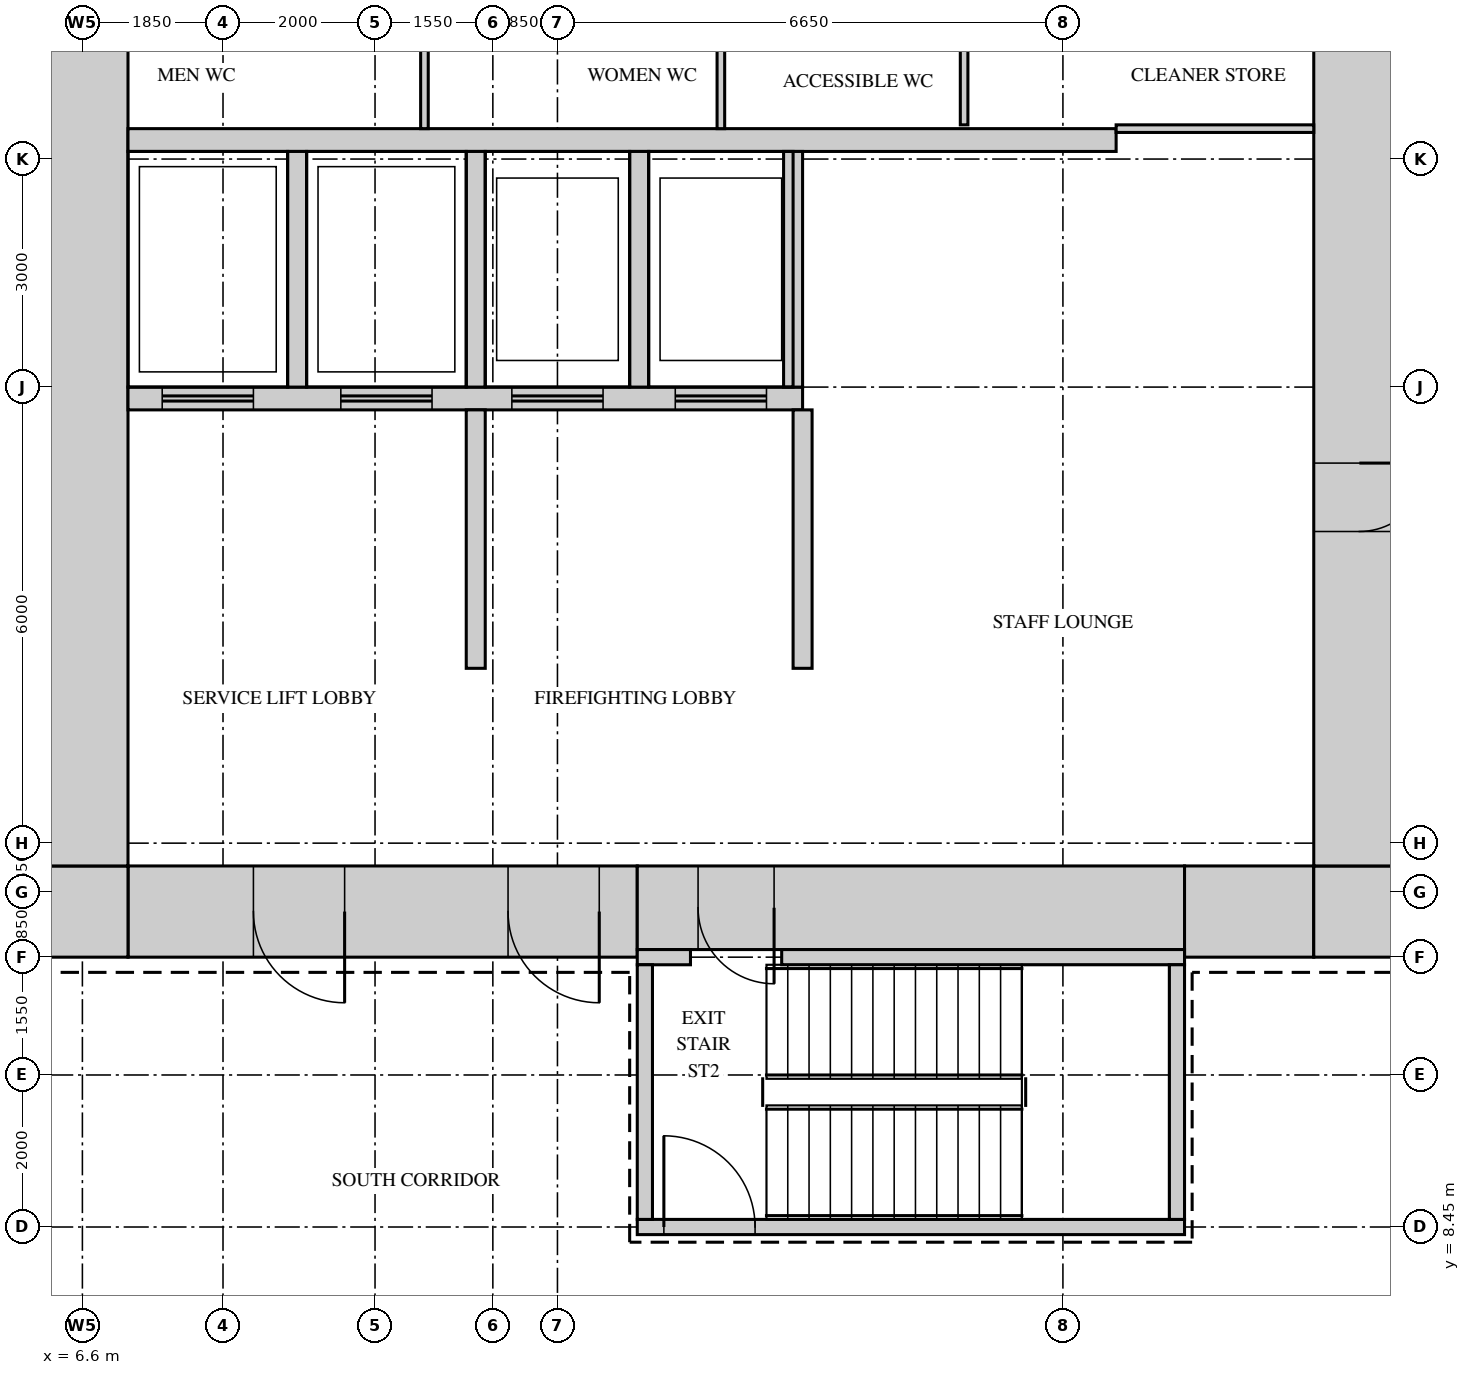
"""IFC4 building model, lengths in metres.
Left out: names, types, materials, properties, quantities, classifications, styles, units other than length and angle.
Written with IfcOpenShell. Run it as: python <this file> out.ifc"""

import sys

from ifc_helpers import new_model, si_unit, direction, frame, frame_2d, origin, place, context, subcontext, project, spatial, rectangle, extrude, source, transform, mapped, element, fill, save


model = new_model("IFC4")
c1 = context("Model", 3, precision=1e-05, world=origin(), true_north=direction((0.0, 1.0)))
c2 = subcontext(c1, "Body", "Model", "MODEL_VIEW")
j1 = project(units=[si_unit("LENGTHUNIT", "METRE"), si_unit("PLANEANGLEUNIT", "RADIAN")], contexts=[c1])
p1 = place(None, origin())
s1 = spatial("IfcSite", under=j1, at=p1, CompositionType="ELEMENT")
p2 = place(p1, origin())
s2 = spatial("IfcBuilding", under=s1, at=p2, CompositionType="ELEMENT")
p3 = place(p2, frame((0.0, 0.0, 64.5)))
s3 = spatial("IfcBuildingStorey", under=s2, at=p3, CompositionType="ELEMENT", Elevation=64.5)
m1 = source(origin(), c2, "Body", "SweptSolid", [
    extrude(rectangle(XDim=6.7, YDim=1.2, at=frame_2d((3.35, 0.0))), origin(), (0.0, 0.0, 1.0), 4.2),
])
p4 = place(p3, frame((7.2, 12.6, 0.0), z_axis=(0.0, 0.0, 1.0), x_axis=(1.0, 0.0, 0.0)))
e1 = element("IfcWall", 1, at=p4, inside=s3, PredefinedType="SHEAR", context=c2, shape_type="MappedRepresentation", body=[
    mapped(m1, transform((0.0, 0.0, 0.0))),
])
m2 = source(origin(), c2, "Body", "SweptSolid", [
    extrude(rectangle(XDim=1.2, YDim=2.1, at=frame_2d((0.6, 1.05))), frame((0.0, 0.61, 0.0), z_axis=(0.0, -1.0, 0.0), x_axis=(1.0, 0.0, 0.0)), (0.0, 0.0, 1.0), 1.22),
])
p5 = place(p4, frame((5.0, 0.0, 0.0)))
e2 = element("IfcOpeningElement", 2, at=p5, cuts=e1, PredefinedType="OPENING", context=c2, shape_type="MappedRepresentation", body=[
    mapped(m2, transform((0.0, 0.0, 0.0))),
])
p6 = place(p4, frame((1.65, 0.0, 0.0)))
e3 = element("IfcOpeningElement", 3, at=p6, cuts=e1, PredefinedType="OPENING", context=c2, shape_type="MappedRepresentation", body=[
    mapped(m2, transform((0.0, 0.0, 0.0))),
])
m3 = source(origin(), c2, "Body", "SweptSolid", [
    extrude(rectangle(XDim=7.2, YDim=1.1, at=frame_2d((3.6, 0.0))), origin(), (0.0, 0.0, 1.0), 4.2),
])
p7 = place(p3, frame((13.9, 12.65, 0.0), z_axis=(0.0, 0.0, 1.0), x_axis=(1.0, 0.0, 0.0)))
e4 = element("IfcWall", 4, at=p7, inside=s3, PredefinedType="SHEAR", context=c2, shape_type="MappedRepresentation", body=[
    mapped(m3, transform((0.0, 0.0, 0.0))),
])
m4 = source(origin(), c2, "Body", "SweptSolid", [
    extrude(rectangle(XDim=1.0, YDim=2.1, at=frame_2d((0.5, 1.05))), frame((0.0, 0.56, 0.0), z_axis=(0.0, -1.0, 0.0), x_axis=(1.0, 0.0, 0.0)), (0.0, 0.0, 1.0), 1.12),
])
p8 = place(p7, frame((0.8, 0.0, 0.0)))
e5 = element("IfcOpeningElement", 5, at=p8, cuts=e4, PredefinedType="OPENING", context=c2, shape_type="MappedRepresentation", body=[
    mapped(m4, transform((0.0, 0.0, 0.0))),
])
m5 = source(origin(), c2, "Body", "SweptSolid", [
    extrude(rectangle(XDim=1.7, YDim=1.2, at=frame_2d((0.85, 0.0))), origin(), (0.0, 0.0, 1.0), 4.2),
])
p9 = place(p3, frame((21.1, 12.6, 0.0), z_axis=(0.0, 0.0, 1.0), x_axis=(1.0, 0.0, 0.0)))
e6 = element("IfcWall", 6, at=p9, inside=s3, PredefinedType="SHEAR", context=c2, shape_type="MappedRepresentation", body=[
    mapped(m5, transform((0.0, 0.0, 0.0))),
])
m6 = source(origin(), c2, "Body", "SweptSolid", [
    extrude(rectangle(XDim=1.2, YDim=1.2, at=frame_2d((0.6, 0.0))), origin(), (0.0, 0.0, 1.0), 4.2),
])
for number, where, z_axis, x_axis in (
    (7, (22.8, 12.6, 0.0), (0.0, 0.0, 1.0), (1.0, 0.0, 0.0)),
    (8, (6.0, 12.6, 0.0), (0.0, 0.0, 1.0), (1.0, 0.0, 0.0)),
):
    element("IfcWall", number, at=place(p3, frame(where, z_axis=z_axis, x_axis=x_axis)), inside=s3, PredefinedType="SHEAR", context=c2, shape_type="MappedRepresentation", body=[
        mapped(m6, transform((0.0, 0.0, 0.0))),
    ])
m7 = source(origin(), c2, "Body", "SweptSolid", [
    extrude(rectangle(XDim=27.6, YDim=1.2, at=frame_2d((13.8, 0.0))), origin(), (0.0, 0.0, 1.0), 4.2),
])
p10 = place(p3, frame((23.4, 13.2, 0.0), z_axis=(0.0, 0.0, 1.0), x_axis=(0.0, 1.0, 0.0)))
e9 = element("IfcWall", 9, at=p10, inside=s3, PredefinedType="SHEAR", context=c2, shape_type="MappedRepresentation", body=[
    mapped(m7, transform((0.0, 0.0, 0.0))),
])
m8 = source(origin(), c2, "Body", "SweptSolid", [
    extrude(rectangle(XDim=1.8, YDim=2.1, at=frame_2d((0.9, 1.05))), frame((0.0, 0.61, 0.0), z_axis=(0.0, -1.0, 0.0), x_axis=(1.0, 0.0, 0.0)), (0.0, 0.0, 1.0), 1.22),
])
p11 = place(p10, frame((22.4, 0.0, 0.0)))
e10 = element("IfcOpeningElement", 10, at=p11, cuts=e9, PredefinedType="OPENING", context=c2, shape_type="MappedRepresentation", body=[
    mapped(m8, transform((0.0, 0.0, 0.0))),
])
p12 = place(p10, frame((12.15, 0.0, 0.0)))
e11 = element("IfcOpeningElement", 11, at=p12, cuts=e9, PredefinedType="OPENING", context=c2, shape_type="MappedRepresentation", body=[
    mapped(m2, transform((0.0, 0.0, 0.0))),
])
m9 = source(origin(), c2, "Body", "SweptSolid", [
    extrude(rectangle(XDim=0.9, YDim=2.1, at=frame_2d((0.45, 1.05))), frame((0.0, 0.61, 0.0), z_axis=(0.0, -1.0, 0.0), x_axis=(1.0, 0.0, 0.0)), (0.0, 0.0, 1.0), 1.22),
])
p13 = place(p10, frame((4.4, 0.0, 0.0)))
e12 = element("IfcOpeningElement", 12, at=p13, cuts=e9, PredefinedType="OPENING", context=c2, shape_type="MappedRepresentation", body=[
    mapped(m9, transform((0.0, 0.0, 0.0))),
])
p14 = place(p3, frame((6.6, 13.2, 0.0), z_axis=(0.0, 0.0, 1.0), x_axis=(0.0, 1.0, 0.0)))
e13 = element("IfcWall", 13, at=p14, inside=s3, PredefinedType="SHEAR", context=c2, shape_type="MappedRepresentation", body=[
    mapped(m7, transform((0.0, 0.0, 0.0))),
])
m10 = source(origin(), c2, "Body", "SweptSolid", [
    extrude(rectangle(XDim=0.7, YDim=0.2, at=frame_2d((0.35, 0.0))), origin(), (0.0, 0.0, 1.0), 4.2),
])
p15 = place(p3, frame((13.9, 12.0, 0.0), z_axis=(0.0, 0.0, 1.0), x_axis=(1.0, 0.0, 0.0)))
e14 = element("IfcWall", 14, at=p15, inside=s3, PredefinedType="SHEAR", context=c2, shape_type="MappedRepresentation", body=[
    mapped(m10, transform((0.0, 0.0, 0.0))),
])
m11 = source(origin(), c2, "Body", "SweptSolid", [
    extrude(rectangle(XDim=5.3, YDim=0.2, at=frame_2d((2.65, 0.0))), origin(), (0.0, 0.0, 1.0), 4.2),
])
p16 = place(p3, frame((15.8, 12.0, 0.0), z_axis=(0.0, 0.0, 1.0), x_axis=(1.0, 0.0, 0.0)))
e15 = element("IfcWall", 15, at=p16, inside=s3, PredefinedType="SHEAR", context=c2, shape_type="MappedRepresentation", body=[
    mapped(m11, transform((0.0, 0.0, 0.0))),
])
m12 = source(origin(), c2, "Body", "SweptSolid", [
    extrude(rectangle(XDim=7.2, YDim=0.2, at=frame_2d((3.6, 0.0))), origin(), (0.0, 0.0, 1.0), 4.2),
])
p17 = place(p3, frame((13.9, 8.45, 0.0), z_axis=(0.0, 0.0, 1.0), x_axis=(1.0, 0.0, 0.0)))
e16 = element("IfcWall", 16, at=p17, inside=s3, PredefinedType="SHEAR", context=c2, shape_type="MappedRepresentation", body=[
    mapped(m12, transform((0.0, 0.0, 0.0))),
])
m13 = source(origin(), c2, "Body", "SweptSolid", [
    extrude(rectangle(XDim=1.2, YDim=2.1, at=frame_2d((0.6, 1.05))), frame((0.0, 0.11, 0.0), z_axis=(0.0, -1.0, 0.0), x_axis=(1.0, 0.0, 0.0)), (0.0, 0.0, 1.0), 0.22),
])
p18 = place(p17, frame((0.35, 0.0, 0.0)))
e17 = element("IfcOpeningElement", 17, at=p18, cuts=e16, PredefinedType="OPENING", context=c2, shape_type="MappedRepresentation", body=[
    mapped(m13, transform((0.0, 0.0, 0.0))),
])
m14 = source(origin(), c2, "Body", "SweptSolid", [
    extrude(rectangle(XDim=3.35, YDim=0.2, at=frame_2d((1.675, 0.0))), origin(), (0.0, 0.0, 1.0), 4.2),
])
for number, where, z_axis, x_axis in (
    (18, (21.0, 8.55, 0.0), (0.0, 0.0, 1.0), (0.0, 1.0, 0.0)),
    (19, (14.0, 8.55, 0.0), (0.0, 0.0, 1.0), (0.0, 1.0, 0.0)),
):
    element("IfcWall", number, at=place(p3, frame(where, z_axis=z_axis, x_axis=x_axis)), inside=s3, PredefinedType="SHEAR", context=c2, shape_type="MappedRepresentation", body=[
        mapped(m14, transform((0.0, 0.0, 0.0))),
    ])
m15 = source(origin(), c2, "Body", "SweptSolid", [
    extrude(rectangle(XDim=13.0, YDim=0.3, at=frame_2d((6.5, 0.0))), origin(), (0.0, 0.0, 1.0), 4.2),
])
p19 = place(p3, frame((7.2, 22.75, 0.0), z_axis=(0.0, 0.0, 1.0), x_axis=(1.0, 0.0, 0.0)))
e20 = element("IfcWall", 20, at=p19, inside=s3, PredefinedType="STANDARD", context=c2, shape_type="MappedRepresentation", body=[
    mapped(m15, transform((0.0, 0.0, 0.0))),
])
m16 = source(origin(), c2, "Body", "SweptSolid", [
    extrude(rectangle(XDim=8.875, YDim=0.3, at=frame_2d((4.438, 0.0))), origin(), (0.0, 0.0, 1.0), 4.2),
])
p20 = place(p3, frame((7.2, 19.35, 0.0), z_axis=(0.0, 0.0, 1.0), x_axis=(1.0, 0.0, 0.0)))
e21 = element("IfcWall", 21, at=p20, inside=s3, PredefinedType="STANDARD", context=c2, shape_type="MappedRepresentation", body=[
    mapped(m16, transform((0.0, 0.0, 0.0))),
])
m17 = source(origin(), c2, "Body", "SweptSolid", [
    extrude(rectangle(XDim=1.2, YDim=2.1, at=frame_2d((0.6, 1.05))), frame((0.0, 0.16, 0.0), z_axis=(0.0, -1.0, 0.0), x_axis=(1.0, 0.0, 0.0)), (0.0, 0.0, 1.0), 0.32),
])
p21 = place(p20, frame((0.45, 0.0, 0.0)))
e22 = element("IfcOpeningElement", 22, at=p21, cuts=e21, PredefinedType="OPENING", context=c2, shape_type="MappedRepresentation", body=[
    mapped(m17, transform((0.0, 0.0, 0.0))),
])
p22 = place(p20, frame((2.8, 0.0, 0.0)))
e23 = element("IfcOpeningElement", 23, at=p22, cuts=e21, PredefinedType="OPENING", context=c2, shape_type="MappedRepresentation", body=[
    mapped(m17, transform((0.0, 0.0, 0.0))),
])
p23 = place(p20, frame((5.05, 0.0, 0.0)))
e24 = element("IfcOpeningElement", 24, at=p23, cuts=e21, PredefinedType="OPENING", context=c2, shape_type="MappedRepresentation", body=[
    mapped(m17, transform((0.0, 0.0, 0.0))),
])
p24 = place(p20, frame((7.2, 0.0, 0.0)))
e25 = element("IfcOpeningElement", 25, at=p24, cuts=e21, PredefinedType="OPENING", context=c2, shape_type="MappedRepresentation", body=[
    mapped(m17, transform((0.0, 0.0, 0.0))),
])
m18 = source(origin(), c2, "Body", "SweptSolid", [
    extrude(rectangle(XDim=3.1, YDim=0.25, at=frame_2d((1.55, 0.0))), origin(), (0.0, 0.0, 1.0), 4.2),
])
for number, where, z_axis, x_axis in (
    (26, (9.425, 19.5, 0.0), (0.0, 0.0, 1.0), (0.0, 1.0, 0.0)),
    (27, (11.775, 19.5, 0.0), (0.0, 0.0, 1.0), (0.0, 1.0, 0.0)),
    (28, (13.925, 19.5, 0.0), (0.0, 0.0, 1.0), (0.0, 1.0, 0.0)),
    (29, (15.95, 19.5, 0.0), (0.0, 0.0, 1.0), (0.0, 1.0, 0.0)),
):
    element("IfcWall", number, at=place(p3, frame(where, z_axis=z_axis, x_axis=x_axis)), inside=s3, PredefinedType="STANDARD", context=c2, shape_type="MappedRepresentation", body=[
        mapped(m18, transform((0.0, 0.0, 0.0))),
    ])
m19 = source(origin(), c2, "Body", "SweptSolid", [
    extrude(rectangle(XDim=3.4, YDim=0.25, at=frame_2d((1.7, 0.0))), origin(), (0.0, 0.0, 1.0), 4.2),
])
for number, where, z_axis, x_axis in (
    (30, (16.075, 15.8, 0.0), (0.0, 0.0, 1.0), (0.0, 1.0, 0.0)),
    (31, (11.775, 15.8, 0.0), (0.0, 0.0, 1.0), (0.0, 1.0, 0.0)),
):
    element("IfcWall", number, at=place(p3, frame(where, z_axis=z_axis, x_axis=x_axis)), inside=s3, PredefinedType="STANDARD", context=c2, shape_type="MappedRepresentation", body=[
        mapped(m19, transform((0.0, 0.0, 0.0))),
    ])
m20 = source(origin(), c2, "Body", "SweptSolid", [
    extrude(rectangle(XDim=2.05, YDim=0.1, at=frame_2d((1.025, 0.0))), origin(), (0.0, 0.0, 1.0), 4.3),
])
for number, where, z_axis, x_axis in (
    (32, (11.1, 22.9, 0.0), (0.0, 0.0, 1.0), (0.0, 1.0, 0.0)),
    (33, (15.0, 22.9, 0.0), (0.0, 0.0, 1.0), (0.0, 1.0, 0.0)),
):
    element("IfcWall", number, at=place(p3, frame(where, z_axis=z_axis, x_axis=x_axis)), inside=s3, PredefinedType="PARTITIONING", context=c2, shape_type="MappedRepresentation", body=[
        mapped(m20, transform((0.0, 0.0, 0.0))),
    ])
m21 = source(origin(), c2, "Body", "SweptSolid", [
    extrude(rectangle(XDim=2.6, YDim=0.1, at=frame_2d((1.3, 0.0))), origin(), (0.0, 0.0, 1.0), 4.3),
])
p25 = place(p3, frame((20.2, 22.9, 0.0), z_axis=(0.0, 0.0, 1.0), x_axis=(1.0, 0.0, 0.0)))
e34 = element("IfcWall", 34, at=p25, inside=s3, PredefinedType="PARTITIONING", context=c2, shape_type="MappedRepresentation", body=[
    mapped(m21, transform((0.0, 0.0, 0.0))),
])
m22 = source(origin(), c2, "Body", "SweptSolid", [
    extrude(rectangle(XDim=2.0, YDim=0.1, at=frame_2d((1.0, 0.0))), origin(), (0.0, 0.0, 1.0), 4.3),
])
p26 = place(p3, frame((18.2, 22.95, 0.0), z_axis=(0.0, 0.0, 1.0), x_axis=(0.0, 1.0, 0.0)))
e35 = element("IfcWall", 35, at=p26, inside=s3, PredefinedType="PARTITIONING", context=c2, shape_type="MappedRepresentation", body=[
    mapped(m22, transform((0.0, 0.0, 0.0))),
])
m23 = source(origin(), c2, "Body", "SweptSolid", [
    extrude(rectangle(XDim=0.9, YDim=2.1, at=frame_2d((0.45, 1.05))), frame((0.0, 0.55, 0.0), z_axis=(0.0, -1.0, 0.0), x_axis=(1.0, 0.0, 0.0)), (0.0, 0.0, 1.0), 1.1),
])
p27 = place(p13, origin())
e36 = element("IfcDoor", 36, at=p27, inside=s3, OperationType="SINGLE_SWING_RIGHT", PredefinedType="DOOR", context=c2, shape_type="MappedRepresentation", body=[
    mapped(m23, transform((0.0, 0.0, 0.0))),
])
fill(e12, e36)
m24 = source(origin(), c2, "Body", "SweptSolid", [
    extrude(rectangle(XDim=1.2, YDim=2.1, at=frame_2d((0.6, 1.05))), frame((0.0, 0.55, 0.0), z_axis=(0.0, -1.0, 0.0), x_axis=(1.0, 0.0, 0.0)), (0.0, 0.0, 1.0), 1.1),
])
p28 = place(p5, origin())
e37 = element("IfcDoor", 37, at=p28, inside=s3, OperationType="SINGLE_SWING_RIGHT", PredefinedType="DOOR", context=c2, shape_type="MappedRepresentation", body=[
    mapped(m24, transform((0.0, 0.0, 0.0))),
])
fill(e2, e37)
p29 = place(p6, origin())
e38 = element("IfcDoor", 38, at=p29, inside=s3, OperationType="SINGLE_SWING_RIGHT", PredefinedType="DOOR", context=c2, shape_type="MappedRepresentation", body=[
    mapped(m24, transform((0.0, 0.0, 0.0))),
])
fill(e3, e38)
m25 = source(origin(), c2, "Body", "SweptSolid", [
    extrude(rectangle(XDim=1.0, YDim=2.1, at=frame_2d((0.5, 1.05))), frame((0.0, 0.5, 0.0), z_axis=(0.0, -1.0, 0.0), x_axis=(1.0, 0.0, 0.0)), (0.0, 0.0, 1.0), 1.0),
])
p30 = place(p8, origin())
e39 = element("IfcDoor", 39, at=p30, inside=s3, OperationType="SINGLE_SWING_RIGHT", PredefinedType="DOOR", context=c2, shape_type="MappedRepresentation", body=[
    mapped(m25, transform((0.0, 0.0, 0.0))),
])
fill(e5, e39)
m26 = source(origin(), c2, "Body", "SweptSolid", [
    extrude(rectangle(XDim=1.2, YDim=2.1, at=frame_2d((0.6, 1.05))), frame((0.0, 0.025, 0.0), z_axis=(0.0, -1.0, 0.0), x_axis=(1.0, 0.0, 0.0)), (0.0, 0.0, 1.0), 0.05),
])
p31 = place(p18, origin())
e40 = element("IfcDoor", 40, at=p31, inside=s3, OperationType="SINGLE_SWING_RIGHT", PredefinedType="DOOR", context=c2, shape_type="MappedRepresentation", body=[
    mapped(m26, transform((0.0, 0.0, 0.0))),
])
fill(e17, e40)
p32 = place(p21, origin())
e41 = element("IfcDoor", 41, at=p32, inside=s3, OperationType="DOUBLE_DOOR_SLIDING", PredefinedType="DOOR", context=c2, shape_type="MappedRepresentation", body=[
    mapped(m26, transform((0.0, 0.0, 0.0))),
])
fill(e22, e41)
p33 = place(p22, origin())
e42 = element("IfcDoor", 42, at=p33, inside=s3, OperationType="DOUBLE_DOOR_SLIDING", PredefinedType="DOOR", context=c2, shape_type="MappedRepresentation", body=[
    mapped(m26, transform((0.0, 0.0, 0.0))),
])
fill(e23, e42)
p34 = place(p23, origin())
e43 = element("IfcDoor", 43, at=p34, inside=s3, OperationType="DOUBLE_DOOR_SLIDING", PredefinedType="DOOR", context=c2, shape_type="MappedRepresentation", body=[
    mapped(m26, transform((0.0, 0.0, 0.0))),
])
fill(e24, e43)
p35 = place(p24, origin())
e44 = element("IfcDoor", 44, at=p35, inside=s3, OperationType="DOUBLE_DOOR_SLIDING", PredefinedType="DOOR", context=c2, shape_type="MappedRepresentation", body=[
    mapped(m26, transform((0.0, 0.0, 0.0))),
])
fill(e25, e44)
save(model, sys.argv[1])
